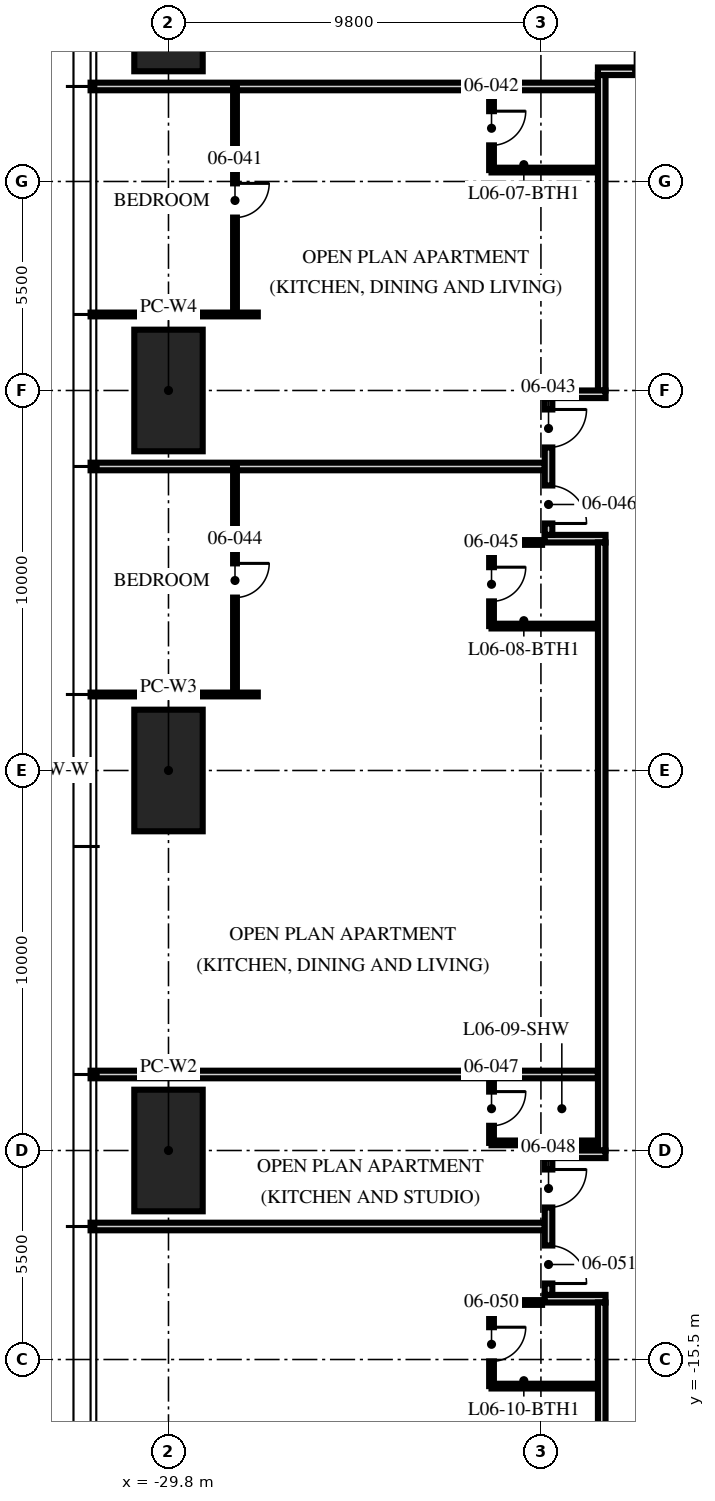
"""IFC4 building model, lengths in metres.
Left out: names, types, materials, properties, quantities, classifications, styles, units other than length and angle.
Written with IfcOpenShell. Run it as: python <this file> out.ifc"""

import sys

from ifc_helpers import new_model, si_unit, direction, frame, frame_2d, origin, origin_2d, place, context, subcontext, project, spatial, rectangle, hollow_rectangle, extrude, element, fill, save


model = new_model("IFC4")
c1 = context("Model", 3, precision=1e-05, world=origin(), true_north=direction((0.0, 1.0)))
c2 = subcontext(c1, "Body", "Model", "MODEL_VIEW")
j1 = project(units=[si_unit("LENGTHUNIT", "METRE"), si_unit("PLANEANGLEUNIT", "RADIAN")], contexts=[c1])
p1 = place(None, origin())
s1 = spatial("IfcSite", under=j1, at=p1, CompositionType="ELEMENT")
p2 = place(p1, origin())
s2 = spatial("IfcBuilding", under=s1, at=p2, CompositionType="ELEMENT")
p3 = place(p2, frame((0.0, 0.0, 28.5)))
s3 = spatial("IfcBuildingStorey", under=s2, at=p3, CompositionType="ELEMENT", Elevation=28.5)
for number, where, z_axis, x_axis in (
    (1, (-29.8, -10.0, 0.0), (0.0, 0.0, 1.0), (0.0, 1.0, 0.0)),
    (2, (-29.8, 0.0, 0.0), (0.0, 0.0, 1.0), (0.0, 1.0, 0.0)),
    (3, (-29.8, 10.0, 0.0), (0.0, 0.0, 1.0), (0.0, 1.0, 0.0)),
    (4, (-29.8, 20.0, 0.0), (0.0, 0.0, 1.0), (0.0, 1.0, 0.0)),
):
    element("IfcColumn", number, at=place(p3, frame(where, z_axis=z_axis, x_axis=x_axis)), inside=s3, PredefinedType="COLUMN", context=c2, shape_type="SweptSolid", body=[
        extrude(hollow_rectangle(XDim=3.2, YDim=1.8, WallThickness=0.2, at=origin_2d()), origin(), (0.0, 0.0, 1.0), 3.75),
    ])
p4 = place(p3, frame((-18.5, 18.0, 0.0), z_axis=(0.0, 0.0, 1.0), x_axis=(-1.0, 0.0, 0.0)))
e5 = element("IfcWall", 5, at=p4, inside=s3, PredefinedType="PARTITIONING", context=c2, shape_type="SweptSolid", body=[
    extrude(rectangle(XDim=13.35, YDim=0.2, at=frame_2d((6.675, 0.0))), origin(), (0.0, 0.0, 1.0), 2.3),
])
p5 = place(p3, frame((-27.45, 12.0, 0.0), z_axis=(0.0, 0.0, 1.0), x_axis=(-1.0, 0.0, 0.0)))
e6 = element("IfcWall", 6, at=p5, inside=s3, PredefinedType="PARTITIONING", context=c2, shape_type="SweptSolid", body=[
    extrude(rectangle(XDim=4.4, YDim=0.1, at=frame_2d((2.2, 0.0))), origin(), (0.0, 0.0, 1.0), 2.71),
])
p6 = place(p3, frame((-19.9, 8.0, 0.0), z_axis=(0.0, 0.0, 1.0), x_axis=(-1.0, 0.0, 0.0)))
e7 = element("IfcWall", 7, at=p6, inside=s3, PredefinedType="PARTITIONING", context=c2, shape_type="SweptSolid", body=[
    extrude(rectangle(XDim=11.95, YDim=0.2, at=frame_2d((5.975, 0.0))), origin(), (0.0, 0.0, 1.0), 2.71),
])
p7 = place(p3, frame((-27.45, 2.0, 0.0), z_axis=(0.0, 0.0, 1.0), x_axis=(-1.0, 0.0, 0.0)))
e8 = element("IfcWall", 8, at=p7, inside=s3, PredefinedType="PARTITIONING", context=c2, shape_type="SweptSolid", body=[
    extrude(rectangle(XDim=4.4, YDim=0.1, at=frame_2d((2.2, 0.0))), origin(), (0.0, 0.0, 1.0), 2.71),
])
p8 = place(p3, frame((-18.5, -8.0, 0.0), z_axis=(0.0, 0.0, 1.0), x_axis=(-1.0, 0.0, 0.0)))
e9 = element("IfcWall", 9, at=p8, inside=s3, PredefinedType="PARTITIONING", context=c2, shape_type="SweptSolid", body=[
    extrude(rectangle(XDim=13.35, YDim=0.2, at=frame_2d((6.675, 0.0))), origin(), (0.0, 0.0, 1.0), 2.71),
])
p9 = place(p3, frame((-19.9, -12.0, 0.0), z_axis=(0.0, 0.0, 1.0), x_axis=(-1.0, 0.0, 0.0)))
e10 = element("IfcWall", 10, at=p9, inside=s3, PredefinedType="PARTITIONING", context=c2, shape_type="SweptSolid", body=[
    extrude(rectangle(XDim=11.95, YDim=0.2, at=frame_2d((5.975, 0.0))), origin(), (0.0, 0.0, 1.0), 2.71),
])
p10 = place(p3, frame((-28.05, 18.0, 0.0), z_axis=(0.0, 0.0, 1.0), x_axis=(0.0, -1.0, 0.0)))
e11 = element("IfcWall", 11, at=p10, inside=s3, PredefinedType="PARTITIONING", context=c2, shape_type="SweptSolid", body=[
    extrude(rectangle(XDim=6.0, YDim=0.1, at=frame_2d((3.0, 0.0))), origin(), (0.0, 0.0, 1.0), 2.61),
])
p11 = place(p10, frame((2.55, 0.0, 0.0)))
e12 = element("IfcOpeningElement", 12, at=p11, cuts=e11, PredefinedType="OPENING", context=c2, shape_type="SweptSolid", body=[
    extrude(rectangle(XDim=0.9, YDim=2.1, at=frame_2d((0.45, 1.05))), frame((0.0, 0.06, 0.0), z_axis=(0.0, -1.0, 0.0), x_axis=(1.0, 0.0, 0.0)), (0.0, 0.0, 1.0), 0.12),
])
p12 = place(p3, frame((-21.3, 18.0, 0.0), z_axis=(0.0, 0.0, 1.0), x_axis=(0.0, -1.0, 0.0)))
e13 = element("IfcWall", 13, at=p12, inside=s3, PredefinedType="PARTITIONING", context=c2, shape_type="SweptSolid", body=[
    extrude(rectangle(XDim=2.2, YDim=0.125, at=frame_2d((1.1, 0.0))), origin(), (0.0, 0.0, 1.0), 3.5),
])
p13 = place(p12, frame((0.65, 0.0, 0.0)))
e14 = element("IfcOpeningElement", 14, at=p13, cuts=e13, PredefinedType="OPENING", context=c2, shape_type="SweptSolid", body=[
    extrude(rectangle(XDim=0.9, YDim=2.1, at=frame_2d((0.45, 1.05))), frame((0.0, 0.073, 0.0), z_axis=(0.0, -1.0, 0.0), x_axis=(1.0, 0.0, 0.0)), (0.0, 0.0, 1.0), 0.145),
])
p14 = place(p3, frame((-18.5, 15.8, 0.0), z_axis=(0.0, 0.0, 1.0), x_axis=(-1.0, 0.0, 0.0)))
e15 = element("IfcWall", 15, at=p14, inside=s3, PredefinedType="PARTITIONING", context=c2, shape_type="SweptSolid", body=[
    extrude(rectangle(XDim=2.8, YDim=0.125, at=frame_2d((1.4, 0.0))), origin(), (0.0, 0.0, 1.0), 3.5),
])
p15 = place(p3, frame((-28.05, 8.0, 0.0), z_axis=(0.0, 0.0, 1.0), x_axis=(0.0, -1.0, 0.0)))
e16 = element("IfcWall", 16, at=p15, inside=s3, PredefinedType="PARTITIONING", context=c2, shape_type="SweptSolid", body=[
    extrude(rectangle(XDim=6.0, YDim=0.1, at=frame_2d((3.0, 0.0))), origin(), (0.0, 0.0, 1.0), 2.61),
])
p16 = place(p15, frame((2.55, 0.0, 0.0)))
e17 = element("IfcOpeningElement", 17, at=p16, cuts=e16, PredefinedType="OPENING", context=c2, shape_type="SweptSolid", body=[
    extrude(rectangle(XDim=0.9, YDim=2.1, at=frame_2d((0.45, 1.05))), frame((0.0, 0.06, 0.0), z_axis=(0.0, -1.0, 0.0), x_axis=(1.0, 0.0, 0.0)), (0.0, 0.0, 1.0), 0.12),
])
p17 = place(p3, frame((-21.3, 6.0, 0.0), z_axis=(0.0, 0.0, 1.0), x_axis=(0.0, -1.0, 0.0)))
e18 = element("IfcWall", 18, at=p17, inside=s3, PredefinedType="PARTITIONING", context=c2, shape_type="SweptSolid", body=[
    extrude(rectangle(XDim=2.2, YDim=0.125, at=frame_2d((1.1, 0.0))), origin(), (0.0, 0.0, 1.0), 2.61),
])
p18 = place(p17, frame((0.65, 0.0, 0.0)))
e19 = element("IfcOpeningElement", 19, at=p18, cuts=e18, PredefinedType="OPENING", context=c2, shape_type="SweptSolid", body=[
    extrude(rectangle(XDim=0.9, YDim=2.1, at=frame_2d((0.45, 1.05))), frame((0.0, 0.073, 0.0), z_axis=(0.0, -1.0, 0.0), x_axis=(1.0, 0.0, 0.0)), (0.0, 0.0, 1.0), 0.145),
])
p19 = place(p3, frame((-19.97, 6.0, 0.0), z_axis=(0.0, 0.0, 1.0), x_axis=(-1.0, 0.0, 0.0)))
e20 = element("IfcWall", 20, at=p19, inside=s3, PredefinedType="PARTITIONING", context=c2, shape_type="SweptSolid", body=[
    extrude(rectangle(XDim=1.33, YDim=0.125, at=frame_2d((0.665, 0.0))), origin(), (0.0, 0.0, 1.0), 3.5),
])
p20 = place(p3, frame((-18.5, 3.8, 0.0), z_axis=(0.0, 0.0, 1.0), x_axis=(-1.0, 0.0, 0.0)))
e21 = element("IfcWall", 21, at=p20, inside=s3, PredefinedType="PARTITIONING", context=c2, shape_type="SweptSolid", body=[
    extrude(rectangle(XDim=2.8, YDim=0.125, at=frame_2d((1.4, 0.0))), origin(), (0.0, 0.0, 1.0), 3.5),
])
p21 = place(p3, frame((-21.3, -8.0, 0.0), z_axis=(0.0, 0.0, 1.0), x_axis=(0.0, -1.0, 0.0)))
e22 = element("IfcWall", 22, at=p21, inside=s3, PredefinedType="PARTITIONING", context=c2, shape_type="SweptSolid", body=[
    extrude(rectangle(XDim=1.8, YDim=0.125, at=frame_2d((0.9, 0.0))), origin(), (0.0, 0.0, 1.0), 3.5),
])
p22 = place(p21, frame((0.45, 0.0, 0.0)))
e23 = element("IfcOpeningElement", 23, at=p22, cuts=e22, PredefinedType="OPENING", context=c2, shape_type="SweptSolid", body=[
    extrude(rectangle(XDim=0.9, YDim=2.1, at=frame_2d((0.45, 1.05))), frame((0.0, 0.073, 0.0), z_axis=(0.0, -1.0, 0.0), x_axis=(1.0, 0.0, 0.0)), (0.0, 0.0, 1.0), 0.145),
])
p23 = place(p3, frame((-18.5, -9.8, 0.0), z_axis=(0.0, 0.0, 1.0), x_axis=(-1.0, 0.0, 0.0)))
e24 = element("IfcWall", 24, at=p23, inside=s3, PredefinedType="PARTITIONING", context=c2, shape_type="SweptSolid", body=[
    extrude(rectangle(XDim=2.8, YDim=0.125, at=frame_2d((1.4, 0.0))), origin(), (0.0, 0.0, 1.0), 2.492),
])
p24 = place(p3, frame((-21.3, -14.0, 0.0), z_axis=(0.0, 0.0, 1.0), x_axis=(0.0, -1.0, 0.0)))
e25 = element("IfcWall", 25, at=p24, inside=s3, PredefinedType="PARTITIONING", context=c2, shape_type="SweptSolid", body=[
    extrude(rectangle(XDim=2.2, YDim=0.125, at=frame_2d((1.1, 0.0))), origin(), (0.0, 0.0, 1.0), 2.61),
])
p25 = place(p24, frame((0.65, 0.0, 0.0)))
e26 = element("IfcOpeningElement", 26, at=p25, cuts=e25, PredefinedType="OPENING", context=c2, shape_type="SweptSolid", body=[
    extrude(rectangle(XDim=0.9, YDim=2.1, at=frame_2d((0.45, 1.05))), frame((0.0, 0.073, 0.0), z_axis=(0.0, -1.0, 0.0), x_axis=(1.0, 0.0, 0.0)), (0.0, 0.0, 1.0), 0.145),
])
p26 = place(p3, frame((-19.97, -14.0, 0.0), z_axis=(0.0, 0.0, 1.0), x_axis=(-1.0, 0.0, 0.0)))
e27 = element("IfcWall", 27, at=p26, inside=s3, PredefinedType="PARTITIONING", context=c2, shape_type="SweptSolid", body=[
    extrude(rectangle(XDim=1.33, YDim=0.125, at=frame_2d((0.665, 0.0))), origin(), (0.0, 0.0, 1.0), 3.5),
])
p27 = place(p3, frame((-18.5, -16.2, 0.0), z_axis=(0.0, 0.0, 1.0), x_axis=(-1.0, 0.0, 0.0)))
e28 = element("IfcWall", 28, at=p27, inside=s3, PredefinedType="PARTITIONING", context=c2, shape_type="SweptSolid", body=[
    extrude(rectangle(XDim=2.8, YDim=0.125, at=frame_2d((1.4, 0.0))), origin(), (0.0, 0.0, 1.0), 3.5),
])
p28 = place(p3, frame((-18.5, 18.4, 0.0), z_axis=(0.0, 0.0, 1.0), x_axis=(1.0, 0.0, 0.0)))
e29 = element("IfcWall", 29, at=p28, inside=s3, PredefinedType="PARTITIONING", context=c2, shape_type="SweptSolid", body=[
    extrude(rectangle(XDim=14.5, YDim=0.2, at=frame_2d((7.25, 0.0))), origin(), (0.0, 0.0, 1.0), 2.3),
])
p29 = place(p28, frame((0.98, 0.0, 0.0)))
e30 = element("IfcOpeningElement", 30, at=p29, cuts=e29, PredefinedType="OPENING", context=c2, shape_type="SweptSolid", body=[
    extrude(rectangle(XDim=1.0, YDim=2.2, at=frame_2d((0.5, 1.1))), frame((0.0, 0.11, 0.0), z_axis=(0.0, -1.0, 0.0), x_axis=(1.0, 0.0, 0.0)), (0.0, 0.0, 1.0), 0.22),
])
p30 = place(p3, frame((-18.4, 18.3, 0.0), z_axis=(0.0, 0.0, 1.0), x_axis=(0.0, -1.0, 0.0)))
e31 = element("IfcWall", 31, at=p30, inside=s3, PredefinedType="PARTITIONING", context=c2, shape_type="SweptSolid", body=[
    extrude(rectangle(XDim=8.3, YDim=0.2, at=frame_2d((4.15, 0.0))), origin(), (0.0, 0.0, 1.0), 2.3),
])
p31 = place(p3, frame((-18.3, 9.9, 0.0), z_axis=(0.0, 0.0, 1.0), x_axis=(-1.0, 0.0, 0.0)))
e32 = element("IfcWall", 32, at=p31, inside=s3, PredefinedType="PARTITIONING", context=c2, shape_type="SweptSolid", body=[
    extrude(rectangle(XDim=1.6, YDim=0.2, at=frame_2d((0.8, 0.0))), origin(), (0.0, 0.0, 1.0), 2.492),
])
p32 = place(p3, frame((-18.3, 6.1, 0.0), z_axis=(0.0, 0.0, 1.0), x_axis=(-1.0, 0.0, 0.0)))
e33 = element("IfcWall", 33, at=p32, inside=s3, PredefinedType="PARTITIONING", context=c2, shape_type="SweptSolid", body=[
    extrude(rectangle(XDim=1.6, YDim=0.2, at=frame_2d((0.8, 0.0))), origin(), (0.0, 0.0, 1.0), 3.5),
])
p33 = place(p3, frame((-19.8, 9.8, 0.0), z_axis=(0.0, 0.0, 1.0), x_axis=(0.0, -1.0, 0.0)))
e34 = element("IfcWall", 34, at=p33, inside=s3, PredefinedType="PARTITIONING", context=c2, shape_type="SweptSolid", body=[
    extrude(rectangle(XDim=3.6, YDim=0.2, at=frame_2d((1.8, 0.0))), origin(), (0.0, 0.0, 1.0), 3.5),
])
p34 = place(p33, frame((0.3, 0.0, 0.0)))
e35 = element("IfcOpeningElement", 35, at=p34, cuts=e34, PredefinedType="OPENING", context=c2, shape_type="SweptSolid", body=[
    extrude(rectangle(XDim=1.0, YDim=2.2, at=frame_2d((0.5, 1.1))), frame((0.0, 0.11, 0.0), z_axis=(0.0, -1.0, 0.0), x_axis=(1.0, 0.0, 0.0)), (0.0, 0.0, 1.0), 0.22),
])
p35 = place(p33, frame((2.3, 0.0, 0.0)))
e36 = element("IfcOpeningElement", 36, at=p35, cuts=e34, PredefinedType="OPENING", context=c2, shape_type="SweptSolid", body=[
    extrude(rectangle(XDim=1.0, YDim=2.2, at=frame_2d((0.5, 1.1))), frame((0.0, 0.11, 0.0), z_axis=(0.0, -1.0, 0.0), x_axis=(1.0, 0.0, 0.0)), (0.0, 0.0, 1.0), 0.22),
])
p36 = place(p3, frame((-18.4, 6.0, 0.0), z_axis=(0.0, 0.0, 1.0), x_axis=(0.0, -1.0, 0.0)))
e37 = element("IfcWall", 37, at=p36, inside=s3, PredefinedType="PARTITIONING", context=c2, shape_type="SweptSolid", body=[
    extrude(rectangle(XDim=16.0, YDim=0.2, at=frame_2d((8.0, 0.0))), origin(), (0.0, 0.0, 1.0), 2.492),
])
p37 = place(p3, frame((-18.3, -10.1, 0.0), z_axis=(0.0, 0.0, 1.0), x_axis=(-1.0, 0.0, 0.0)))
e38 = element("IfcWall", 38, at=p37, inside=s3, PredefinedType="PARTITIONING", context=c2, shape_type="SweptSolid", body=[
    extrude(rectangle(XDim=1.6, YDim=0.2, at=frame_2d((0.8, 0.0))), origin(), (0.0, 0.0, 1.0), 2.492),
])
p38 = place(p3, frame((-18.3, -13.9, 0.0), z_axis=(0.0, 0.0, 1.0), x_axis=(-1.0, 0.0, 0.0)))
e39 = element("IfcWall", 39, at=p38, inside=s3, PredefinedType="PARTITIONING", context=c2, shape_type="SweptSolid", body=[
    extrude(rectangle(XDim=1.6, YDim=0.2, at=frame_2d((0.8, 0.0))), origin(), (0.0, 0.0, 1.0), 3.5),
])
p39 = place(p3, frame((-19.8, -10.2, 0.0), z_axis=(0.0, 0.0, 1.0), x_axis=(0.0, -1.0, 0.0)))
e40 = element("IfcWall", 40, at=p39, inside=s3, PredefinedType="PARTITIONING", context=c2, shape_type="SweptSolid", body=[
    extrude(rectangle(XDim=3.6, YDim=0.2, at=frame_2d((1.8, 0.0))), origin(), (0.0, 0.0, 1.0), 3.5),
])
p40 = place(p39, frame((0.3, 0.0, 0.0)))
e41 = element("IfcOpeningElement", 41, at=p40, cuts=e40, PredefinedType="OPENING", context=c2, shape_type="SweptSolid", body=[
    extrude(rectangle(XDim=1.0, YDim=2.2, at=frame_2d((0.5, 1.1))), frame((0.0, 0.11, 0.0), z_axis=(0.0, -1.0, 0.0), x_axis=(1.0, 0.0, 0.0)), (0.0, 0.0, 1.0), 0.22),
])
p41 = place(p39, frame((2.3, 0.0, 0.0)))
e42 = element("IfcOpeningElement", 42, at=p41, cuts=e40, PredefinedType="OPENING", context=c2, shape_type="SweptSolid", body=[
    extrude(rectangle(XDim=1.0, YDim=2.2, at=frame_2d((0.5, 1.1))), frame((0.0, 0.11, 0.0), z_axis=(0.0, -1.0, 0.0), x_axis=(1.0, 0.0, 0.0)), (0.0, 0.0, 1.0), 0.22),
])
p42 = place(p3, frame((-18.4, -14.0, 0.0), z_axis=(0.0, 0.0, 1.0), x_axis=(0.0, -1.0, 0.0)))
e43 = element("IfcWall", 43, at=p42, inside=s3, PredefinedType="PARTITIONING", context=c2, shape_type="SweptSolid", body=[
    extrude(rectangle(XDim=4.3, YDim=0.2, at=frame_2d((2.15, 0.0))), origin(), (0.0, 0.0, 1.0), 2.3),
])
p43 = place(p29, origin())
e44 = element("IfcDoor", 44, at=p43, inside=s3, OperationType="SINGLE_SWING_LEFT", PredefinedType="DOOR", context=c2, shape_type="SweptSolid", body=[
    extrude(rectangle(XDim=1.0, YDim=2.2, at=frame_2d((0.5, 1.1))), frame((0.0, 0.025, 0.0), z_axis=(0.0, -1.0, 0.0), x_axis=(1.0, 0.0, 0.0)), (0.0, 0.0, 1.0), 0.05),
])
fill(e30, e44)
p44 = place(p11, origin())
e45 = element("IfcDoor", 45, at=p44, inside=s3, OperationType="SINGLE_SWING_LEFT", PredefinedType="DOOR", context=c2, shape_type="SweptSolid", body=[
    extrude(rectangle(XDim=0.9, YDim=2.1, at=frame_2d((0.45, 1.05))), frame((0.0, 0.025, 0.0), z_axis=(0.0, -1.0, 0.0), x_axis=(1.0, 0.0, 0.0)), (0.0, 0.0, 1.0), 0.05),
])
fill(e12, e45)
p45 = place(p13, origin())
e46 = element("IfcDoor", 46, at=p45, inside=s3, OperationType="SINGLE_SWING_LEFT", PredefinedType="DOOR", context=c2, shape_type="SweptSolid", body=[
    extrude(rectangle(XDim=0.9, YDim=2.1, at=frame_2d((0.45, 1.05))), frame((0.0, 0.025, 0.0), z_axis=(0.0, -1.0, 0.0), x_axis=(1.0, 0.0, 0.0)), (0.0, 0.0, 1.0), 0.05),
])
fill(e14, e46)
p46 = place(p34, origin())
e47 = element("IfcDoor", 47, at=p46, inside=s3, OperationType="SINGLE_SWING_LEFT", PredefinedType="DOOR", context=c2, shape_type="SweptSolid", body=[
    extrude(rectangle(XDim=1.0, YDim=2.2, at=frame_2d((0.5, 1.1))), frame((0.0, 0.025, 0.0), z_axis=(0.0, -1.0, 0.0), x_axis=(1.0, 0.0, 0.0)), (0.0, 0.0, 1.0), 0.05),
])
fill(e35, e47)
p47 = place(p16, origin())
e48 = element("IfcDoor", 48, at=p47, inside=s3, OperationType="SINGLE_SWING_LEFT", PredefinedType="DOOR", context=c2, shape_type="SweptSolid", body=[
    extrude(rectangle(XDim=0.9, YDim=2.1, at=frame_2d((0.45, 1.05))), frame((0.0, 0.025, 0.0), z_axis=(0.0, -1.0, 0.0), x_axis=(1.0, 0.0, 0.0)), (0.0, 0.0, 1.0), 0.05),
])
fill(e17, e48)
p48 = place(p18, origin())
e49 = element("IfcDoor", 49, at=p48, inside=s3, OperationType="SINGLE_SWING_LEFT", PredefinedType="DOOR", context=c2, shape_type="SweptSolid", body=[
    extrude(rectangle(XDim=0.9, YDim=2.1, at=frame_2d((0.45, 1.05))), frame((0.0, 0.025, 0.0), z_axis=(0.0, -1.0, 0.0), x_axis=(1.0, 0.0, 0.0)), (0.0, 0.0, 1.0), 0.05),
])
fill(e19, e49)
p49 = place(p35, origin())
e50 = element("IfcDoor", 50, at=p49, inside=s3, OperationType="SINGLE_SWING_RIGHT", PredefinedType="DOOR", context=c2, shape_type="SweptSolid", body=[
    extrude(rectangle(XDim=1.0, YDim=2.2, at=frame_2d((0.5, 1.1))), frame((0.0, 0.025, 0.0), z_axis=(0.0, -1.0, 0.0), x_axis=(1.0, 0.0, 0.0)), (0.0, 0.0, 1.0), 0.05),
])
fill(e36, e50)
p50 = place(p22, origin())
e51 = element("IfcDoor", 51, at=p50, inside=s3, OperationType="SINGLE_SWING_LEFT", PredefinedType="DOOR", context=c2, shape_type="SweptSolid", body=[
    extrude(rectangle(XDim=0.9, YDim=2.1, at=frame_2d((0.45, 1.05))), frame((0.0, 0.025, 0.0), z_axis=(0.0, -1.0, 0.0), x_axis=(1.0, 0.0, 0.0)), (0.0, 0.0, 1.0), 0.05),
])
fill(e23, e51)
p51 = place(p40, origin())
e52 = element("IfcDoor", 52, at=p51, inside=s3, OperationType="SINGLE_SWING_LEFT", PredefinedType="DOOR", context=c2, shape_type="SweptSolid", body=[
    extrude(rectangle(XDim=1.0, YDim=2.2, at=frame_2d((0.5, 1.1))), frame((0.0, 0.025, 0.0), z_axis=(0.0, -1.0, 0.0), x_axis=(1.0, 0.0, 0.0)), (0.0, 0.0, 1.0), 0.05),
])
fill(e41, e52)
p52 = place(p25, origin())
e53 = element("IfcDoor", 53, at=p52, inside=s3, OperationType="SINGLE_SWING_LEFT", PredefinedType="DOOR", context=c2, shape_type="SweptSolid", body=[
    extrude(rectangle(XDim=0.9, YDim=2.1, at=frame_2d((0.45, 1.05))), frame((0.0, 0.025, 0.0), z_axis=(0.0, -1.0, 0.0), x_axis=(1.0, 0.0, 0.0)), (0.0, 0.0, 1.0), 0.05),
])
fill(e26, e53)
p53 = place(p41, origin())
e54 = element("IfcDoor", 54, at=p53, inside=s3, OperationType="SINGLE_SWING_RIGHT", PredefinedType="DOOR", context=c2, shape_type="SweptSolid", body=[
    extrude(rectangle(XDim=1.0, YDim=2.2, at=frame_2d((0.5, 1.1))), frame((0.0, 0.025, 0.0), z_axis=(0.0, -1.0, 0.0), x_axis=(1.0, 0.0, 0.0)), (0.0, 0.0, 1.0), 0.05),
])
fill(e42, e54)
save(model, sys.argv[1])
